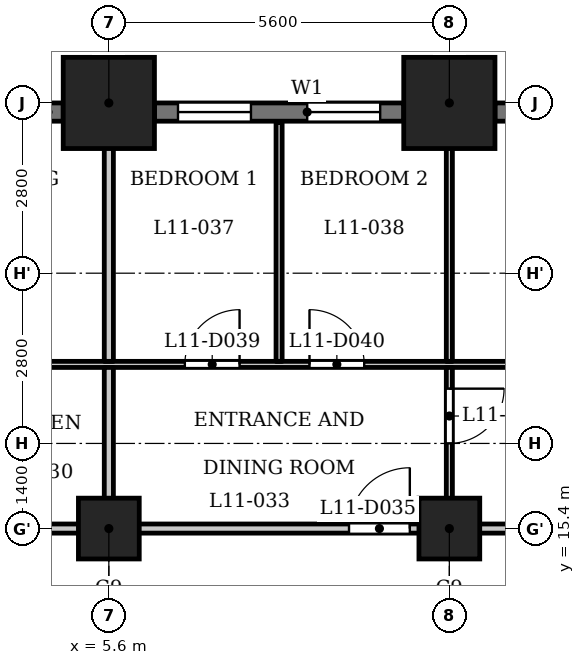
"""IFC4 building model, lengths in metres.
Left out: names, types, materials, properties, quantities, classifications, styles, units other than length and angle.
Written with IfcOpenShell. Run it as: python <this file> out.ifc"""

import sys

from ifc_helpers import new_model, si_unit, direction, frame, frame_2d, origin, origin_2d, place, context, subcontext, project, spatial, rectangle, extrude, element, fill, save


model = new_model("IFC4")
c1 = context("Model", 3, precision=1e-05, world=origin(), true_north=direction((0.0, 1.0)))
c2 = subcontext(c1, "Body", "Model", "MODEL_VIEW")
j1 = project(units=[si_unit("LENGTHUNIT", "METRE"), si_unit("PLANEANGLEUNIT", "RADIAN")], contexts=[c1])
p1 = place(None, origin())
s1 = spatial("IfcSite", under=j1, at=p1, CompositionType="ELEMENT")
p2 = place(p1, origin())
s2 = spatial("IfcBuilding", under=s1, at=p2, CompositionType="ELEMENT")
p3 = place(p2, frame((0.0, 0.0, 48.0)))
s3 = spatial("IfcBuildingStorey", under=s2, at=p3, CompositionType="ELEMENT", Elevation=48.0)
for number, where, z_axis, x_axis in (
    (1, (11.2, 22.4, 0.0), (0.0, 0.0, 1.0), (1.0, 0.0, 0.0)),
    (2, (5.6, 22.4, 0.0), (0.0, 0.0, 1.0), (1.0, 0.0, 0.0)),
):
    element("IfcColumn", number, at=place(p3, frame(where, z_axis=z_axis, x_axis=x_axis)), inside=s3, PredefinedType="COLUMN", context=c2, shape_type="SweptSolid", body=[
        extrude(rectangle(XDim=1.5, YDim=1.5, at=origin_2d()), origin(), (0.0, 0.0, 1.0), 3.5),
    ])
for number, where, z_axis, x_axis in (
    (3, (5.6, 15.4, 0.0), (0.0, 0.0, 1.0), (1.0, 0.0, 0.0)),
    (4, (11.2, 15.4, 0.0), (0.0, 0.0, 1.0), (1.0, 0.0, 0.0)),
):
    element("IfcColumn", number, at=place(p3, frame(where, z_axis=z_axis, x_axis=x_axis)), inside=s3, PredefinedType="COLUMN", context=c2, shape_type="SweptSolid", body=[
        extrude(rectangle(XDim=1.0, YDim=1.0, at=origin_2d()), origin(), (0.0, 0.0, 1.0), 3.5),
    ])
p4 = place(p3, frame((16.05, 22.25, 0.0), z_axis=(0.0, 0.0, 1.0), x_axis=(-1.0, 0.0, 0.0)))
e5 = element("IfcWall", 5, at=p4, inside=s3, PredefinedType="SOLIDWALL", context=c2, shape_type="SweptSolid", body=[
    extrude(rectangle(XDim=4.1, YDim=0.3, at=frame_2d((2.05, 0.0))), origin(), (0.0, 0.0, 1.0), 2.35),
])
p5 = place(p4, frame((0.25, 0.0, 1.2)))
e6 = element("IfcOpeningElement", 6, at=p5, cuts=e5, PredefinedType="OPENING", context=c2, shape_type="SweptSolid", body=[
    extrude(rectangle(XDim=3.6, YDim=0.95, at=frame_2d((1.8, 0.475))), frame((0.0, 0.16, 0.0), z_axis=(0.0, -1.0, 0.0), x_axis=(1.0, 0.0, 0.0)), (0.0, 0.0, 1.0), 0.32),
])
p6 = place(p3, frame((10.45, 22.25, 0.0), z_axis=(0.0, 0.0, 1.0), x_axis=(-1.0, 0.0, 0.0)))
e7 = element("IfcWall", 7, at=p6, inside=s3, PredefinedType="SOLIDWALL", context=c2, shape_type="SweptSolid", body=[
    extrude(rectangle(XDim=4.1, YDim=0.3, at=frame_2d((2.05, 0.0))), origin(), (0.0, 0.0, 1.0), 2.35),
])
p7 = place(p6, frame((0.387, 0.0, 0.6)))
e8 = element("IfcOpeningElement", 8, at=p7, cuts=e7, PredefinedType="OPENING", context=c2, shape_type="SweptSolid", body=[
    extrude(rectangle(XDim=1.2, YDim=1.55, at=frame_2d((0.6, 0.775))), frame((0.0, 0.16, 0.0), z_axis=(0.0, -1.0, 0.0), x_axis=(1.0, 0.0, 0.0)), (0.0, 0.0, 1.0), 0.32),
])
p8 = place(p6, frame((2.512, 0.0, 0.6)))
e9 = element("IfcOpeningElement", 9, at=p8, cuts=e7, PredefinedType="OPENING", context=c2, shape_type="SweptSolid", body=[
    extrude(rectangle(XDim=1.2, YDim=1.55, at=frame_2d((0.6, 0.775))), frame((0.0, 0.16, 0.0), z_axis=(0.0, -1.0, 0.0), x_axis=(1.0, 0.0, 0.0)), (0.0, 0.0, 1.0), 0.32),
])
p9 = place(p3, frame((4.85, 22.25, 0.0), z_axis=(0.0, 0.0, 1.0), x_axis=(-1.0, 0.0, 0.0)))
e10 = element("IfcWall", 10, at=p9, inside=s3, PredefinedType="SOLIDWALL", context=c2, shape_type="SweptSolid", body=[
    extrude(rectangle(XDim=4.1, YDim=0.3, at=frame_2d((2.05, 0.0))), origin(), (0.0, 0.0, 1.0), 2.35),
])
p10 = place(p9, frame((0.25, 0.0, 1.2)))
e11 = element("IfcOpeningElement", 11, at=p10, cuts=e10, PredefinedType="OPENING", context=c2, shape_type="SweptSolid", body=[
    extrude(rectangle(XDim=3.6, YDim=0.95, at=frame_2d((1.8, 0.475))), frame((0.0, 0.16, 0.0), z_axis=(0.0, -1.0, 0.0), x_axis=(1.0, 0.0, 0.0)), (0.0, 0.0, 1.0), 0.32),
])
p11 = place(p3, frame((-27.484, 15.4, 0.0), z_axis=(0.0, 0.0, 1.0), x_axis=(1.0, 0.0, 0.0)))
e12 = element("IfcWall", 12, at=p11, inside=s3, PredefinedType="PARTITIONING", context=c2, shape_type="SweptSolid", body=[
    extrude(rectangle(XDim=54.968, YDim=0.15, at=frame_2d((27.484, 0.0))), origin(), (0.0, 0.0, 1.0), 3.2),
])
p12 = place(p11, frame((8.784, 0.0, 0.0)))
e13 = element("IfcOpeningElement", 13, at=p12, cuts=e12, PredefinedType="OPENING", context=c2, shape_type="SweptSolid", body=[
    extrude(rectangle(XDim=1.0, YDim=2.1, at=frame_2d((0.5, 1.05))), frame((0.0, 0.085, 0.0), z_axis=(0.0, -1.0, 0.0), x_axis=(1.0, 0.0, 0.0)), (0.0, 0.0, 1.0), 0.17),
])
p13 = place(p11, frame((14.634, 0.0, 0.0)))
e14 = element("IfcOpeningElement", 14, at=p13, cuts=e12, PredefinedType="OPENING", context=c2, shape_type="SweptSolid", body=[
    extrude(rectangle(XDim=1.0, YDim=2.1, at=frame_2d((0.5, 1.05))), frame((0.0, 0.085, 0.0), z_axis=(0.0, -1.0, 0.0), x_axis=(1.0, 0.0, 0.0)), (0.0, 0.0, 1.0), 0.17),
])
p14 = place(p11, frame((25.834, 0.0, 0.0)))
e15 = element("IfcOpeningElement", 15, at=p14, cuts=e12, PredefinedType="OPENING", context=c2, shape_type="SweptSolid", body=[
    extrude(rectangle(XDim=1.0, YDim=2.1, at=frame_2d((0.5, 1.05))), frame((0.0, 0.085, 0.0), z_axis=(0.0, -1.0, 0.0), x_axis=(1.0, 0.0, 0.0)), (0.0, 0.0, 1.0), 0.17),
])
p15 = place(p11, frame((30.184, 0.0, 0.0)))
e16 = element("IfcOpeningElement", 16, at=p15, cuts=e12, PredefinedType="OPENING", context=c2, shape_type="SweptSolid", body=[
    extrude(rectangle(XDim=1.0, YDim=2.1, at=frame_2d((0.5, 1.05))), frame((0.0, 0.085, 0.0), z_axis=(0.0, -1.0, 0.0), x_axis=(1.0, 0.0, 0.0)), (0.0, 0.0, 1.0), 0.17),
])
p16 = place(p11, frame((37.034, 0.0, 0.0)))
e17 = element("IfcOpeningElement", 17, at=p16, cuts=e12, PredefinedType="OPENING", context=c2, shape_type="SweptSolid", body=[
    extrude(rectangle(XDim=1.0, YDim=2.1, at=frame_2d((0.5, 1.05))), frame((0.0, 0.085, 0.0), z_axis=(0.0, -1.0, 0.0), x_axis=(1.0, 0.0, 0.0)), (0.0, 0.0, 1.0), 0.17),
])
p17 = place(p11, frame((48.234, 0.0, 0.0)))
e18 = element("IfcOpeningElement", 18, at=p17, cuts=e12, PredefinedType="OPENING", context=c2, shape_type="SweptSolid", body=[
    extrude(rectangle(XDim=1.0, YDim=2.1, at=frame_2d((0.5, 1.05))), frame((0.0, 0.085, 0.0), z_axis=(0.0, -1.0, 0.0), x_axis=(1.0, 0.0, 0.0)), (0.0, 0.0, 1.0), 0.17),
])
p18 = place(p3, frame((-26.44, 18.1, 0.0), z_axis=(0.0, 0.0, 1.0), x_axis=(1.0, 0.0, 0.0)))
e19 = element("IfcWall", 19, at=p18, inside=s3, PredefinedType="PARTITIONING", context=c2, shape_type="SweptSolid", body=[
    extrude(rectangle(XDim=52.63, YDim=0.1, at=frame_2d((26.315, 0.0))), origin(), (0.0, 0.0, 1.0), 3.2),
])
p19 = place(p18, frame((2.626, 0.0, 0.0)))
e20 = element("IfcOpeningElement", 20, at=p19, cuts=e19, PredefinedType="OPENING", context=c2, shape_type="SweptSolid", body=[
    extrude(rectangle(XDim=0.8, YDim=2.1, at=frame_2d((0.4, 1.05))), frame((0.0, 0.06, 0.0), z_axis=(0.0, -1.0, 0.0), x_axis=(1.0, 0.0, 0.0)), (0.0, 0.0, 1.0), 0.12),
])
p20 = place(p18, frame((7.84, 0.0, 0.0)))
e21 = element("IfcOpeningElement", 21, at=p20, cuts=e19, PredefinedType="OPENING", context=c2, shape_type="SweptSolid", body=[
    extrude(rectangle(XDim=0.9, YDim=2.1, at=frame_2d((0.45, 1.05))), frame((0.0, 0.06, 0.0), z_axis=(0.0, -1.0, 0.0), x_axis=(1.0, 0.0, 0.0)), (0.0, 0.0, 1.0), 0.12),
])
p21 = place(p18, frame((18.49, 0.0, 0.0)))
e22 = element("IfcOpeningElement", 22, at=p21, cuts=e19, PredefinedType="OPENING", context=c2, shape_type="SweptSolid", body=[
    extrude(rectangle(XDim=0.8, YDim=2.1, at=frame_2d((0.4, 1.05))), frame((0.0, 0.06, 0.0), z_axis=(0.0, -1.0, 0.0), x_axis=(1.0, 0.0, 0.0)), (0.0, 0.0, 1.0), 0.12),
])
p22 = place(p18, frame((16.54, 0.0, 0.0)))
e23 = element("IfcOpeningElement", 23, at=p22, cuts=e19, PredefinedType="OPENING", context=c2, shape_type="SweptSolid", body=[
    extrude(rectangle(XDim=0.9, YDim=2.1, at=frame_2d((0.45, 1.05))), frame((0.0, 0.06, 0.0), z_axis=(0.0, -1.0, 0.0), x_axis=(1.0, 0.0, 0.0)), (0.0, 0.0, 1.0), 0.12),
])
p23 = place(p18, frame((10.89, 0.0, 0.0)))
e24 = element("IfcOpeningElement", 24, at=p23, cuts=e19, PredefinedType="OPENING", context=c2, shape_type="SweptSolid", body=[
    extrude(rectangle(XDim=0.9, YDim=2.1, at=frame_2d((0.45, 1.05))), frame((0.0, 0.06, 0.0), z_axis=(0.0, -1.0, 0.0), x_axis=(1.0, 0.0, 0.0)), (0.0, 0.0, 1.0), 0.12),
])
p24 = place(p18, frame((12.94, 0.0, 0.0)))
e25 = element("IfcOpeningElement", 25, at=p24, cuts=e19, PredefinedType="OPENING", context=c2, shape_type="SweptSolid", body=[
    extrude(rectangle(XDim=0.9, YDim=2.1, at=frame_2d((0.45, 1.05))), frame((0.0, 0.06, 0.0), z_axis=(0.0, -1.0, 0.0), x_axis=(1.0, 0.0, 0.0)), (0.0, 0.0, 1.0), 0.12),
])
p25 = place(p18, frame((21.49, 0.0, 0.0)))
e26 = element("IfcOpeningElement", 26, at=p25, cuts=e19, PredefinedType="OPENING", context=c2, shape_type="SweptSolid", body=[
    extrude(rectangle(XDim=0.8, YDim=2.1, at=frame_2d((0.4, 1.05))), frame((0.0, 0.06, 0.0), z_axis=(0.0, -1.0, 0.0), x_axis=(1.0, 0.0, 0.0)), (0.0, 0.0, 1.0), 0.12),
])
p26 = place(p18, frame((24.89, 0.0, 0.0)))
e27 = element("IfcOpeningElement", 27, at=p26, cuts=e19, PredefinedType="OPENING", context=c2, shape_type="SweptSolid", body=[
    extrude(rectangle(XDim=0.9, YDim=2.1, at=frame_2d((0.45, 1.05))), frame((0.0, 0.06, 0.0), z_axis=(0.0, -1.0, 0.0), x_axis=(1.0, 0.0, 0.0)), (0.0, 0.0, 1.0), 0.12),
])
p27 = place(p18, frame((27.09, 0.0, 0.0)))
e28 = element("IfcOpeningElement", 28, at=p27, cuts=e19, PredefinedType="OPENING", context=c2, shape_type="SweptSolid", body=[
    extrude(rectangle(XDim=0.8, YDim=2.1, at=frame_2d((0.4, 1.05))), frame((0.0, 0.06, 0.0), z_axis=(0.0, -1.0, 0.0), x_axis=(1.0, 0.0, 0.0)), (0.0, 0.0, 1.0), 0.12),
])
p28 = place(p18, frame((28.99, 0.0, 0.0)))
e29 = element("IfcOpeningElement", 29, at=p28, cuts=e19, PredefinedType="OPENING", context=c2, shape_type="SweptSolid", body=[
    extrude(rectangle(XDim=0.9, YDim=2.1, at=frame_2d((0.45, 1.05))), frame((0.0, 0.06, 0.0), z_axis=(0.0, -1.0, 0.0), x_axis=(1.0, 0.0, 0.0)), (0.0, 0.0, 1.0), 0.12),
])
p29 = place(p18, frame((41.69, 0.0, 0.0)))
e30 = element("IfcOpeningElement", 30, at=p29, cuts=e19, PredefinedType="OPENING", context=c2, shape_type="SweptSolid", body=[
    extrude(rectangle(XDim=0.8, YDim=2.1, at=frame_2d((0.4, 1.05))), frame((0.0, 0.06, 0.0), z_axis=(0.0, -1.0, 0.0), x_axis=(1.0, 0.0, 0.0)), (0.0, 0.0, 1.0), 0.12),
])
p30 = place(p18, frame((38.99, 0.0, 0.0)))
e31 = element("IfcOpeningElement", 31, at=p30, cuts=e19, PredefinedType="OPENING", context=c2, shape_type="SweptSolid", body=[
    extrude(rectangle(XDim=0.9, YDim=2.1, at=frame_2d((0.45, 1.05))), frame((0.0, 0.06, 0.0), z_axis=(0.0, -1.0, 0.0), x_axis=(1.0, 0.0, 0.0)), (0.0, 0.0, 1.0), 0.12),
])
p31 = place(p18, frame((33.29, 0.0, 0.0)))
e32 = element("IfcOpeningElement", 32, at=p31, cuts=e19, PredefinedType="OPENING", context=c2, shape_type="SweptSolid", body=[
    extrude(rectangle(XDim=0.9, YDim=2.1, at=frame_2d((0.45, 1.05))), frame((0.0, 0.06, 0.0), z_axis=(0.0, -1.0, 0.0), x_axis=(1.0, 0.0, 0.0)), (0.0, 0.0, 1.0), 0.12),
])
p32 = place(p18, frame((35.34, 0.0, 0.0)))
e33 = element("IfcOpeningElement", 33, at=p32, cuts=e19, PredefinedType="OPENING", context=c2, shape_type="SweptSolid", body=[
    extrude(rectangle(XDim=0.9, YDim=2.1, at=frame_2d((0.45, 1.05))), frame((0.0, 0.06, 0.0), z_axis=(0.0, -1.0, 0.0), x_axis=(1.0, 0.0, 0.0)), (0.0, 0.0, 1.0), 0.12),
])
p33 = place(p18, frame((50.74, 0.0, 0.0)))
e34 = element("IfcOpeningElement", 34, at=p33, cuts=e19, PredefinedType="OPENING", context=c2, shape_type="SweptSolid", body=[
    extrude(rectangle(XDim=0.8, YDim=2.1, at=frame_2d((0.4, 1.05))), frame((0.0, 0.06, 0.0), z_axis=(0.0, -1.0, 0.0), x_axis=(1.0, 0.0, 0.0)), (0.0, 0.0, 1.0), 0.12),
])
p34 = place(p18, frame((47.29, 0.0, 0.0)))
e35 = element("IfcOpeningElement", 35, at=p34, cuts=e19, PredefinedType="OPENING", context=c2, shape_type="SweptSolid", body=[
    extrude(rectangle(XDim=0.9, YDim=2.1, at=frame_2d((0.45, 1.05))), frame((0.0, 0.06, 0.0), z_axis=(0.0, -1.0, 0.0), x_axis=(1.0, 0.0, 0.0)), (0.0, 0.0, 1.0), 0.12),
])
p35 = place(p3, frame((5.6, 15.475, 0.0), z_axis=(0.0, 0.0, 1.0), x_axis=(0.0, 1.0, 0.0)))
e36 = element("IfcWall", 36, at=p35, inside=s3, PredefinedType="PARTITIONING", context=c2, shape_type="SweptSolid", body=[
    extrude(rectangle(XDim=2.575, YDim=0.15, at=frame_2d((1.288, 0.0))), origin(), (0.0, 0.0, 1.0), 3.2),
])
p36 = place(p3, frame((5.6, 18.15, 0.0), z_axis=(0.0, 0.0, 1.0), x_axis=(0.0, 1.0, 0.0)))
e37 = element("IfcWall", 37, at=p36, inside=s3, PredefinedType="PARTITIONING", context=c2, shape_type="SweptSolid", body=[
    extrude(rectangle(XDim=4.98, YDim=0.15, at=frame_2d((2.49, 0.0))), origin(), (0.0, 0.0, 1.0), 3.2),
])
p37 = place(p3, frame((8.4, 18.15, 0.0), z_axis=(0.0, 0.0, 1.0), x_axis=(0.0, 1.0, 0.0)))
e38 = element("IfcWall", 38, at=p37, inside=s3, PredefinedType="PARTITIONING", context=c2, shape_type="SweptSolid", body=[
    extrude(rectangle(XDim=3.93, YDim=0.1, at=frame_2d((1.965, 0.0))), origin(), (0.0, 0.0, 1.0), 3.2),
])
p38 = place(p3, frame((11.2, 15.475, 0.0), z_axis=(0.0, 0.0, 1.0), x_axis=(0.0, 1.0, 0.0)))
e39 = element("IfcWall", 39, at=p38, inside=s3, PredefinedType="PARTITIONING", context=c2, shape_type="SweptSolid", body=[
    extrude(rectangle(XDim=2.575, YDim=0.1, at=frame_2d((1.288, 0.0))), origin(), (0.0, 0.0, 1.0), 3.2),
])
p39 = place(p38, frame((1.326, 0.0, 0.0)))
e40 = element("IfcOpeningElement", 40, at=p39, cuts=e39, PredefinedType="OPENING", context=c2, shape_type="SweptSolid", body=[
    extrude(rectangle(XDim=0.9, YDim=2.1, at=frame_2d((0.45, 1.05))), frame((0.0, 0.06, 0.0), z_axis=(0.0, -1.0, 0.0), x_axis=(1.0, 0.0, 0.0)), (0.0, 0.0, 1.0), 0.12),
])
p40 = place(p3, frame((11.2, 18.15, 0.0), z_axis=(0.0, 0.0, 1.0), x_axis=(0.0, 1.0, 0.0)))
e41 = element("IfcWall", 41, at=p40, inside=s3, PredefinedType="PARTITIONING", context=c2, shape_type="SweptSolid", body=[
    extrude(rectangle(XDim=4.98, YDim=0.1, at=frame_2d((2.49, 0.0))), origin(), (0.0, 0.0, 1.0), 3.2),
])
p41 = place(p16, origin())
e42 = element("IfcDoor", 42, at=p41, inside=s3, OperationType="SINGLE_SWING_LEFT", PredefinedType="DOOR", context=c2, shape_type="SweptSolid", body=[
    extrude(rectangle(XDim=1.0, YDim=2.1, at=frame_2d((0.5, 1.05))), frame((0.0, 0.025, 0.0), z_axis=(0.0, -1.0, 0.0), x_axis=(1.0, 0.0, 0.0)), (0.0, 0.0, 1.0), 0.05),
])
fill(e17, e42)
p42 = place(p39, origin())
e43 = element("IfcDoor", 43, at=p42, inside=s3, OperationType="SINGLE_SWING_RIGHT", PredefinedType="DOOR", context=c2, shape_type="SweptSolid", body=[
    extrude(rectangle(XDim=0.9, YDim=2.1, at=frame_2d((0.45, 1.05))), frame((0.0, 0.025, 0.0), z_axis=(0.0, -1.0, 0.0), x_axis=(1.0, 0.0, 0.0)), (0.0, 0.0, 1.0), 0.05),
])
fill(e40, e43)
p43 = place(p31, origin())
e44 = element("IfcDoor", 44, at=p43, inside=s3, OperationType="SINGLE_SWING_LEFT", PredefinedType="DOOR", context=c2, shape_type="SweptSolid", body=[
    extrude(rectangle(XDim=0.9, YDim=2.1, at=frame_2d((0.45, 1.05))), frame((0.0, 0.025, 0.0), z_axis=(0.0, -1.0, 0.0), x_axis=(1.0, 0.0, 0.0)), (0.0, 0.0, 1.0), 0.05),
])
fill(e32, e44)
p44 = place(p32, origin())
e45 = element("IfcDoor", 45, at=p44, inside=s3, OperationType="SINGLE_SWING_RIGHT", PredefinedType="DOOR", context=c2, shape_type="SweptSolid", body=[
    extrude(rectangle(XDim=0.9, YDim=2.1, at=frame_2d((0.45, 1.05))), frame((0.0, 0.025, 0.0), z_axis=(0.0, -1.0, 0.0), x_axis=(1.0, 0.0, 0.0)), (0.0, 0.0, 1.0), 0.05),
])
fill(e33, e45)
p45 = place(p7, origin())
e46 = element("IfcWindow", 46, at=p45, inside=s3, PartitioningType="SINGLE_PANEL", PredefinedType="WINDOW", context=c2, shape_type="SweptSolid", body=[
    extrude(rectangle(XDim=1.2, YDim=1.55, at=frame_2d((0.6, 0.775))), frame((0.0, 0.03, 0.0), z_axis=(0.0, -1.0, 0.0), x_axis=(1.0, 0.0, 0.0)), (0.0, 0.0, 1.0), 0.06),
])
fill(e8, e46)
p46 = place(p8, origin())
e47 = element("IfcWindow", 47, at=p46, inside=s3, PartitioningType="SINGLE_PANEL", PredefinedType="WINDOW", context=c2, shape_type="SweptSolid", body=[
    extrude(rectangle(XDim=1.2, YDim=1.55, at=frame_2d((0.6, 0.775))), frame((0.0, 0.03, 0.0), z_axis=(0.0, -1.0, 0.0), x_axis=(1.0, 0.0, 0.0)), (0.0, 0.0, 1.0), 0.06),
])
fill(e9, e47)
save(model, sys.argv[1])
